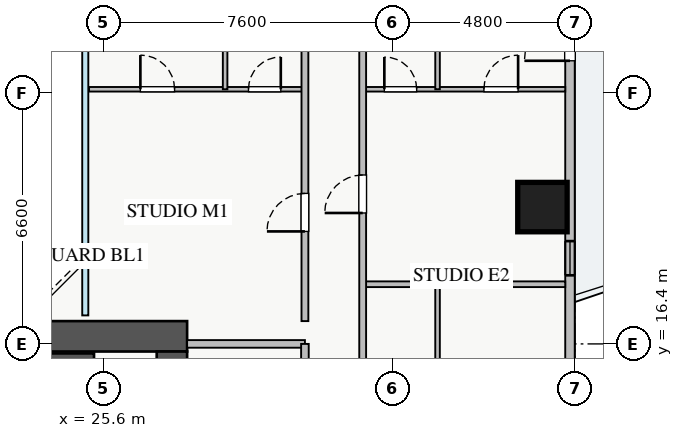
"""IFC4 building model, lengths in metres.
Left out: names, types, materials, properties, quantities, classifications, styles, units other than length and angle.
Written with IfcOpenShell. Run it as: python <this file> out.ifc"""

import sys

from ifc_helpers import new_model, si_unit, direction, frame, frame_2d, origin, origin_2d, place, context, subcontext, project, spatial, rectangle, extrude, source, transform, mapped, element, fill, save


model = new_model("IFC4")
c1 = context("Model", 3, precision=1e-05, world=origin(), true_north=direction((0.0, 1.0)))
c2 = subcontext(c1, "Body", "Model", "MODEL_VIEW")
j1 = project(units=[si_unit("LENGTHUNIT", "METRE"), si_unit("PLANEANGLEUNIT", "RADIAN")], contexts=[c1])
p1 = place(None, origin())
s1 = spatial("IfcSite", under=j1, at=p1, CompositionType="ELEMENT")
p2 = place(p1, origin())
s2 = spatial("IfcBuilding", under=s1, at=p2, CompositionType="ELEMENT")
p3 = place(p2, frame((0.0, 0.0, 32.75)))
s3 = spatial("IfcBuildingStorey", under=s2, at=p3, CompositionType="ELEMENT", Elevation=32.75)
p4 = place(p3, frame((18.2, 16.05, 0.0), z_axis=(0.0, 0.0, 1.0), x_axis=(1.0, 0.0, 0.0)))
e1 = element("IfcWall", 1, at=p4, inside=s3, PredefinedType="SHEAR", context=c2, shape_type="SweptSolid", body=[
    extrude(rectangle(XDim=7.15, YDim=0.2, at=frame_2d((3.575, 0.0))), origin(), (0.0, 0.0, 1.0), 3.25),
])
p5 = place(p3, frame((10.2, 16.6, 0.0), z_axis=(0.0, 0.0, 1.0), x_axis=(1.0, 0.0, 0.0)))
e2 = element("IfcWall", 2, at=p5, inside=s3, PredefinedType="SHEAR", context=c2, shape_type="SweptSolid", body=[
    extrude(rectangle(XDim=17.6, YDim=0.8, at=frame_2d((8.8, 0.0))), origin(), (0.0, 0.0, 1.0), 3.25),
])
p6 = place(p3, frame((27.4, 10.6, 0.0), z_axis=(0.0, 0.0, 1.0), x_axis=(0.0, 1.0, 0.0)))
e3 = element("IfcWall", 3, at=p6, inside=s3, PredefinedType="SHEAR", context=c2, shape_type="SweptSolid", body=[
    extrude(rectangle(XDim=5.6, YDim=0.8, at=frame_2d((2.8, 0.0))), origin(), (0.0, 0.0, 1.0), 3.25),
])
p7 = place(p6, frame((2.1, 0.0, 0.0)))
e4 = element("IfcOpeningElement", 4, at=p7, cuts=e3, PredefinedType="OPENING", context=c2, shape_type="SweptSolid", body=[
    extrude(rectangle(XDim=1.3, YDim=2.05, at=frame_2d((0.65, 1.025))), frame((0.0, 0.41, 0.0), z_axis=(0.0, -1.0, 0.0), x_axis=(1.0, 0.0, 0.0)), (0.0, 0.0, 1.0), 0.82),
])
m1 = source(origin(), c2, "Body", "SweptSolid", [
    extrude(rectangle(XDim=1.3, YDim=1.3, at=origin_2d()), origin(), (0.0, 0.0, 1.0), 3.25),
])
p8 = place(p3, frame((37.15, 20.0, 0.0), z_axis=(0.0, 0.0, 1.0), x_axis=(1.0, 0.0, 0.0)))
e5 = element("IfcColumn", 5, at=p8, inside=s3, PredefinedType="COLUMN", context=c2, shape_type="MappedRepresentation", body=[
    mapped(m1, transform((0.0, 0.0, 0.0), x_axis=(1.0, 0.0, 0.0), y_axis=(0.0, 1.0, 0.0), z_axis=(0.0, 0.0, 1.0), scale=1.0)),
])
p9 = place(p3, frame((37.875, 9.45, 0.0), z_axis=(0.0, 0.0, 1.0), x_axis=(0.0, 1.0, 0.0)))
e6 = element("IfcWall", 6, at=p9, inside=s3, PredefinedType="STANDARD", context=c2, shape_type="SweptSolid", body=[
    extrude(rectangle(XDim=27.1, YDim=0.25, at=frame_2d((13.55, 0.0))), origin(), (0.0, 0.0, 1.0), 2.61),
])
p10 = place(p9, frame((14.4, 0.0, 0.0)))
e7 = element("IfcOpeningElement", 7, at=p10, cuts=e6, PredefinedType="OPENING", context=c2, shape_type="SweptSolid", body=[
    extrude(rectangle(XDim=1.2, YDim=2.1, at=frame_2d((0.6, 1.05))), frame((0.0, 0.135, 0.0), z_axis=(0.0, -1.0, 0.0), x_axis=(1.0, 0.0, 0.0)), (0.0, 0.0, 1.0), 0.27),
])
p11 = place(p9, frame((1.552, 0.0, 0.9)))
e8 = element("IfcOpeningElement", 8, at=p11, cuts=e6, PredefinedType="OPENING", context=c2, shape_type="SweptSolid", body=[
    extrude(rectangle(XDim=2.4, YDim=1.5, at=frame_2d((1.2, 0.75))), frame((0.0, 0.135, 0.0), z_axis=(0.0, -1.0, 0.0), x_axis=(1.0, 0.0, 0.0)), (0.0, 0.0, 1.0), 0.27),
])
p12 = place(p9, frame((23.788, 0.0, 0.9)))
e9 = element("IfcOpeningElement", 9, at=p12, cuts=e6, PredefinedType="OPENING", context=c2, shape_type="SweptSolid", body=[
    extrude(rectangle(XDim=1.8, YDim=1.5, at=frame_2d((0.9, 0.75))), frame((0.0, 0.135, 0.0), z_axis=(0.0, -1.0, 0.0), x_axis=(1.0, 0.0, 0.0)), (0.0, 0.0, 1.0), 0.27),
])
p13 = place(p9, frame((19.758, 0.0, 0.9)))
e10 = element("IfcOpeningElement", 10, at=p13, cuts=e6, PredefinedType="OPENING", context=c2, shape_type="SweptSolid", body=[
    extrude(rectangle(XDim=2.4, YDim=1.5, at=frame_2d((1.2, 0.75))), frame((0.0, 0.135, 0.0), z_axis=(0.0, -1.0, 0.0), x_axis=(1.0, 0.0, 0.0)), (0.0, 0.0, 1.0), 0.27),
])
p14 = place(p9, frame((8.755, 0.0, 0.9)))
e11 = element("IfcOpeningElement", 11, at=p14, cuts=e6, PredefinedType="OPENING", context=c2, shape_type="SweptSolid", body=[
    extrude(rectangle(XDim=0.9, YDim=1.2, at=frame_2d((0.45, 0.6))), frame((0.0, 0.135, 0.0), z_axis=(0.0, -1.0, 0.0), x_axis=(1.0, 0.0, 0.0)), (0.0, 0.0, 1.0), 0.27),
])
p15 = place(p3, frame((27.8, 16.4, 0.0), z_axis=(0.0, 0.0, 1.0), x_axis=(1.0, 0.0, 0.0)))
e12 = element("IfcWall", 12, at=p15, inside=s3, PredefinedType="PARTITIONING", context=c2, shape_type="SweptSolid", body=[
    extrude(rectangle(XDim=3.1, YDim=0.2, at=frame_2d((1.55, 0.0))), origin(), (0.0, 0.0, 1.0), 3.07),
])
p16 = place(p3, frame((30.9, 12.5, 0.0), z_axis=(0.0, 0.0, 1.0), x_axis=(0.0, 1.0, 0.0)))
e13 = element("IfcWall", 13, at=p16, inside=s3, PredefinedType="PARTITIONING", context=c2, shape_type="SweptSolid", body=[
    extrude(rectangle(XDim=3.9, YDim=0.2, at=frame_2d((1.95, 0.0))), origin(), (0.0, 0.0, 1.0), 3.07),
])
p17 = place(p16, frame((1.4, 0.0, 0.0)))
e14 = element("IfcOpeningElement", 14, at=p17, cuts=e13, PredefinedType="OPENING", context=c2, shape_type="SweptSolid", body=[
    extrude(rectangle(XDim=1.1, YDim=2.05, at=frame_2d((0.55, 1.025))), frame((0.0, 0.11, 0.0), z_axis=(0.0, -1.0, 0.0), x_axis=(1.0, 0.0, 0.0)), (0.0, 0.0, 1.0), 0.22),
])
p18 = place(p3, frame((34.39, 13.81, 0.0), z_axis=(0.0, 0.0, 1.0), x_axis=(0.0, 1.0, 0.0)))
e15 = element("IfcWall", 15, at=p18, inside=s3, PredefinedType="PLUMBINGWALL", context=c2, shape_type="SweptSolid", body=[
    extrude(rectangle(XDim=4.16, YDim=0.12, at=frame_2d((2.08, 0.0))), origin(), (0.0, 0.0, 1.0), 3.07),
])
p19 = place(p3, frame((32.42, 23.1, 0.0), z_axis=(0.0, 0.0, 1.0), x_axis=(1.0, 0.0, 0.0)))
e16 = element("IfcWall", 16, at=p19, inside=s3, PredefinedType="PLUMBINGWALL", context=c2, shape_type="SweptSolid", body=[
    extrude(rectangle(XDim=5.33, YDim=0.12, at=frame_2d((2.665, 0.0))), origin(), (0.0, 0.0, 1.0), 3.07),
])
p20 = place(p19, frame((0.57, 0.0, 0.0)))
e17 = element("IfcOpeningElement", 17, at=p20, cuts=e16, PredefinedType="OPENING", context=c2, shape_type="SweptSolid", body=[
    extrude(rectangle(XDim=0.85, YDim=2.05, at=frame_2d((0.425, 1.025))), frame((0.0, 0.07, 0.0), z_axis=(0.0, -1.0, 0.0), x_axis=(1.0, 0.0, 0.0)), (0.0, 0.0, 1.0), 0.14),
])
p21 = place(p19, frame((3.19, 0.0, 0.0)))
e18 = element("IfcOpeningElement", 18, at=p21, cuts=e16, PredefinedType="OPENING", context=c2, shape_type="SweptSolid", body=[
    extrude(rectangle(XDim=0.9, YDim=2.05, at=frame_2d((0.45, 1.025))), frame((0.0, 0.07, 0.0), z_axis=(0.0, -1.0, 0.0), x_axis=(1.0, 0.0, 0.0)), (0.0, 0.0, 1.0), 0.14),
])
p22 = place(p3, frame((34.39, 23.1, 0.0), z_axis=(0.0, 0.0, 1.0), x_axis=(0.0, 1.0, 0.0)))
e19 = element("IfcWall", 19, at=p22, inside=s3, PredefinedType="PLUMBINGWALL", context=c2, shape_type="SweptSolid", body=[
    extrude(rectangle(XDim=4.83, YDim=0.12, at=frame_2d((2.415, 0.0))), origin(), (0.0, 0.0, 1.0), 3.07),
])
p23 = place(p3, frame((32.42, 17.97, 0.0), z_axis=(0.0, 0.0, 1.0), x_axis=(1.0, 0.0, 0.0)))
e20 = element("IfcWall", 20, at=p23, inside=s3, PredefinedType="PARTITIONING", context=c2, shape_type="SweptSolid", body=[
    extrude(rectangle(XDim=5.33, YDim=0.15, at=frame_2d((2.665, 0.0))), origin(), (0.0, 0.0, 1.0), 3.07),
])
p24 = place(p3, frame((32.42, 7.21, 0.0), z_axis=(0.0, 0.0, 1.0), x_axis=(0.0, 1.0, 0.0)))
e21 = element("IfcWall", 21, at=p24, inside=s3, PredefinedType="PARTITIONING", context=c2, shape_type="SweptSolid", body=[
    extrude(rectangle(XDim=31.23, YDim=0.18, at=frame_2d((15.615, 0.0))), origin(), (0.0, 0.0, 1.0), 2.771),
])
p25 = place(p24, frame((30.09, 0.0, 0.0)))
e22 = element("IfcOpeningElement", 22, at=p25, cuts=e21, PredefinedType="OPENING", context=c2, shape_type="SweptSolid", body=[
    extrude(rectangle(XDim=0.9, YDim=2.05, at=frame_2d((0.45, 1.025))), frame((0.0, 0.1, 0.0), z_axis=(0.0, -1.0, 0.0), x_axis=(1.0, 0.0, 0.0)), (0.0, 0.0, 1.0), 0.2),
])
p26 = place(p24, frame((0.415, 0.0, 0.0)))
e23 = element("IfcOpeningElement", 23, at=p26, cuts=e21, PredefinedType="OPENING", context=c2, shape_type="SweptSolid", body=[
    extrude(rectangle(XDim=0.9, YDim=2.05, at=frame_2d((0.45, 1.025))), frame((0.0, 0.1, 0.0), z_axis=(0.0, -1.0, 0.0), x_axis=(1.0, 0.0, 0.0)), (0.0, 0.0, 1.0), 0.2),
])
p27 = place(p24, frame((3.465, 0.0, 0.0)))
e24 = element("IfcOpeningElement", 24, at=p27, cuts=e21, PredefinedType="OPENING", context=c2, shape_type="SweptSolid", body=[
    extrude(rectangle(XDim=1.0, YDim=2.05, at=frame_2d((0.5, 1.025))), frame((0.0, 0.1, 0.0), z_axis=(0.0, -1.0, 0.0), x_axis=(1.0, 0.0, 0.0)), (0.0, 0.0, 1.0), 0.2),
])
p28 = place(p24, frame((12.635, 0.0, 0.0)))
e25 = element("IfcOpeningElement", 25, at=p28, cuts=e21, PredefinedType="OPENING", context=c2, shape_type="SweptSolid", body=[
    extrude(rectangle(XDim=1.0, YDim=2.05, at=frame_2d((0.5, 1.025))), frame((0.0, 0.1, 0.0), z_axis=(0.0, -1.0, 0.0), x_axis=(1.0, 0.0, 0.0)), (0.0, 0.0, 1.0), 0.2),
])
p29 = place(p24, frame((22.5, 0.0, 0.0)))
e26 = element("IfcOpeningElement", 26, at=p29, cuts=e21, PredefinedType="OPENING", context=c2, shape_type="SweptSolid", body=[
    extrude(rectangle(XDim=1.0, YDim=2.05, at=frame_2d((0.5, 1.025))), frame((0.0, 0.1, 0.0), z_axis=(0.0, -1.0, 0.0), x_axis=(1.0, 0.0, 0.0)), (0.0, 0.0, 1.0), 0.2),
])
p30 = place(p3, frame((25.22, 23.1, 0.0), z_axis=(0.0, 0.0, 1.0), x_axis=(1.0, 0.0, 0.0)))
e27 = element("IfcWall", 27, at=p30, inside=s3, PredefinedType="PLUMBINGWALL", context=c2, shape_type="SweptSolid", body=[
    extrude(rectangle(XDim=5.68, YDim=0.12, at=frame_2d((2.84, 0.0))), origin(), (0.0, 0.0, 1.0), 3.07),
])
p31 = place(p30, frame((1.35, 0.0, 0.0)))
e28 = element("IfcOpeningElement", 28, at=p31, cuts=e27, PredefinedType="OPENING", context=c2, shape_type="SweptSolid", body=[
    extrude(rectangle(XDim=0.9, YDim=2.05, at=frame_2d((0.45, 1.025))), frame((0.0, 0.07, 0.0), z_axis=(0.0, -1.0, 0.0), x_axis=(1.0, 0.0, 0.0)), (0.0, 0.0, 1.0), 0.14),
])
p32 = place(p30, frame((4.195, 0.0, 0.0)))
e29 = element("IfcOpeningElement", 29, at=p32, cuts=e27, PredefinedType="OPENING", context=c2, shape_type="SweptSolid", body=[
    extrude(rectangle(XDim=0.85, YDim=2.05, at=frame_2d((0.425, 1.025))), frame((0.0, 0.07, 0.0), z_axis=(0.0, -1.0, 0.0), x_axis=(1.0, 0.0, 0.0)), (0.0, 0.0, 1.0), 0.14),
])
p33 = place(p3, frame((28.8, 23.1, 0.0), z_axis=(0.0, 0.0, 1.0), x_axis=(0.0, 1.0, 0.0)))
e30 = element("IfcWall", 30, at=p33, inside=s3, PredefinedType="PLUMBINGWALL", context=c2, shape_type="SweptSolid", body=[
    extrude(rectangle(XDim=5.9, YDim=0.12, at=frame_2d((2.95, 0.0))), origin(), (0.0, 0.0, 1.0), 3.07),
])
p34 = place(p3, frame((30.9, 17.0, 0.0), z_axis=(0.0, 0.0, 1.0), x_axis=(0.0, 1.0, 0.0)))
e31 = element("IfcWall", 31, at=p34, inside=s3, PredefinedType="PARTITIONING", context=c2, shape_type="SweptSolid", body=[
    extrude(rectangle(XDim=12.0, YDim=0.18, at=frame_2d((6.0, 0.0))), origin(), (0.0, 0.0, 1.0), 3.07),
])
p35 = place(p34, frame((2.36, 0.0, 0.0)))
e32 = element("IfcOpeningElement", 32, at=p35, cuts=e31, PredefinedType="OPENING", context=c2, shape_type="SweptSolid", body=[
    extrude(rectangle(XDim=1.0, YDim=2.05, at=frame_2d((0.5, 1.025))), frame((0.0, 0.1, 0.0), z_axis=(0.0, -1.0, 0.0), x_axis=(1.0, 0.0, 0.0)), (0.0, 0.0, 1.0), 0.2),
])
m2 = source(origin(), c2, "Body", "SweptSolid", [
    extrude(rectangle(XDim=1.2, YDim=2.1, at=frame_2d((0.6, 1.05))), frame((0.0, 0.025, 0.0), z_axis=(0.0, -1.0, 0.0), x_axis=(1.0, 0.0, 0.0)), (0.0, 0.0, 1.0), 0.05),
])
p36 = place(p10, origin())
e33 = element("IfcDoor", 33, at=p36, inside=s3, OperationType="SINGLE_SWING_LEFT", PredefinedType="DOOR", context=c2, shape_type="MappedRepresentation", body=[
    mapped(m2, transform((0.0, 0.0, 0.0), x_axis=(1.0, 0.0, 0.0), y_axis=(0.0, 1.0, 0.0), z_axis=(0.0, 0.0, 1.0), scale=1.0)),
])
fill(e7, e33)
m3 = source(origin(), c2, "Body", "SweptSolid", [
    extrude(rectangle(XDim=0.85, YDim=2.05, at=frame_2d((0.425, 1.025))), frame((0.0, 0.025, 0.0), z_axis=(0.0, -1.0, 0.0), x_axis=(1.0, 0.0, 0.0)), (0.0, 0.0, 1.0), 0.05),
])
p37 = place(p20, origin())
e34 = element("IfcDoor", 34, at=p37, inside=s3, OperationType="SINGLE_SWING_LEFT", PredefinedType="DOOR", context=c2, shape_type="MappedRepresentation", body=[
    mapped(m3, transform((0.0, 0.0, 0.0), x_axis=(1.0, 0.0, 0.0), y_axis=(0.0, 1.0, 0.0), z_axis=(0.0, 0.0, 1.0), scale=1.0)),
])
fill(e17, e34)
m4 = source(origin(), c2, "Body", "SweptSolid", [
    extrude(rectangle(XDim=0.9, YDim=2.05, at=frame_2d((0.45, 1.025))), frame((0.0, 0.025, 0.0), z_axis=(0.0, -1.0, 0.0), x_axis=(1.0, 0.0, 0.0)), (0.0, 0.0, 1.0), 0.05),
])
p38 = place(p21, origin())
e35 = element("IfcDoor", 35, at=p38, inside=s3, OperationType="SINGLE_SWING_RIGHT", PredefinedType="DOOR", context=c2, shape_type="MappedRepresentation", body=[
    mapped(m4, transform((0.0, 0.0, 0.0), x_axis=(1.0, 0.0, 0.0), y_axis=(0.0, 1.0, 0.0), z_axis=(0.0, 0.0, 1.0), scale=1.0)),
])
fill(e18, e35)
m5 = source(origin(), c2, "Body", "SweptSolid", [
    extrude(rectangle(XDim=1.0, YDim=2.05, at=frame_2d((0.5, 1.025))), frame((0.0, 0.025, 0.0), z_axis=(0.0, -1.0, 0.0), x_axis=(1.0, 0.0, 0.0)), (0.0, 0.0, 1.0), 0.05),
])
p39 = place(p28, origin())
e36 = element("IfcDoor", 36, at=p39, inside=s3, OperationType="SINGLE_SWING_LEFT", PredefinedType="DOOR", context=c2, shape_type="MappedRepresentation", body=[
    mapped(m5, transform((0.0, 0.0, 0.0), x_axis=(1.0, 0.0, 0.0), y_axis=(0.0, 1.0, 0.0), z_axis=(0.0, 0.0, 1.0), scale=1.0)),
])
fill(e25, e36)
p40 = place(p31, origin())
e37 = element("IfcDoor", 37, at=p40, inside=s3, OperationType="SINGLE_SWING_LEFT", PredefinedType="DOOR", context=c2, shape_type="MappedRepresentation", body=[
    mapped(m4, transform((0.0, 0.0, 0.0), x_axis=(1.0, 0.0, 0.0), y_axis=(0.0, 1.0, 0.0), z_axis=(0.0, 0.0, 1.0), scale=1.0)),
])
fill(e28, e37)
p41 = place(p32, origin())
e38 = element("IfcDoor", 38, at=p41, inside=s3, OperationType="SINGLE_SWING_RIGHT", PredefinedType="DOOR", context=c2, shape_type="MappedRepresentation", body=[
    mapped(m3, transform((0.0, 0.0, 0.0), x_axis=(1.0, 0.0, 0.0), y_axis=(0.0, 1.0, 0.0), z_axis=(0.0, 0.0, 1.0), scale=1.0)),
])
fill(e29, e38)
p42 = place(p35, origin())
e39 = element("IfcDoor", 39, at=p42, inside=s3, OperationType="SINGLE_SWING_LEFT", PredefinedType="DOOR", context=c2, shape_type="MappedRepresentation", body=[
    mapped(m5, transform((0.0, 0.0, 0.0), x_axis=(1.0, 0.0, 0.0), y_axis=(0.0, 1.0, 0.0), z_axis=(0.0, 0.0, 1.0), scale=1.0)),
])
fill(e32, e39)
m6 = source(origin(), c2, "Body", "SweptSolid", [
    extrude(rectangle(XDim=0.9, YDim=1.2, at=frame_2d((0.45, 0.6))), frame((0.0, 0.03, 0.0), z_axis=(0.0, -1.0, 0.0), x_axis=(1.0, 0.0, 0.0)), (0.0, 0.0, 1.0), 0.06),
])
p43 = place(p14, origin())
e40 = element("IfcWindow", 40, at=p43, inside=s3, PartitioningType="SINGLE_PANEL", PredefinedType="WINDOW", context=c2, shape_type="MappedRepresentation", body=[
    mapped(m6, transform((0.0, 0.0, 0.0), x_axis=(1.0, 0.0, 0.0), y_axis=(0.0, 1.0, 0.0), z_axis=(0.0, 0.0, 1.0), scale=1.0)),
])
fill(e11, e40)
save(model, sys.argv[1])
